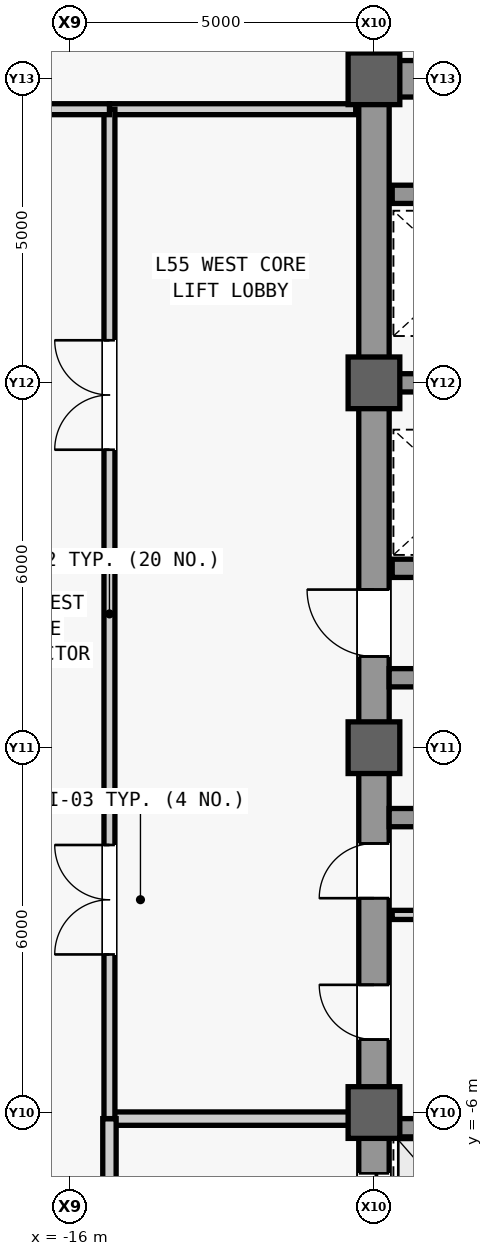
"""IFC4 building model, lengths in metres.
Left out: names, types, materials, properties, quantities, classifications, styles, units other than length and angle.
Written with IfcOpenShell. Run it as: python <this file> out.ifc"""

import sys

from ifc_helpers import new_model, si_unit, direction, frame, frame_2d, origin, origin_2d, place, context, subcontext, project, spatial, rectangle, extrude, source, transform, mapped, element, fill, save


model = new_model("IFC4")
c1 = context("Model", 3, precision=1e-05, world=origin(), true_north=direction((0.0, 1.0)))
c2 = subcontext(c1, "Body", "Model", "MODEL_VIEW")
j1 = project(units=[si_unit("LENGTHUNIT", "METRE"), si_unit("PLANEANGLEUNIT", "RADIAN")], contexts=[c1])
p1 = place(None, origin())
s1 = spatial("IfcSite", under=j1, at=p1, CompositionType="ELEMENT")
p2 = place(p1, origin())
s2 = spatial("IfcBuilding", under=s1, at=p2, CompositionType="ELEMENT")
p3 = place(p2, frame((0.0, 0.0, 235.1)))
s3 = spatial("IfcBuildingStorey", under=s2, at=p3, CompositionType="ELEMENT", Elevation=235.1)
m1 = source(origin(), c2, "Body", "SweptSolid", [
    extrude(rectangle(XDim=22.0, YDim=0.5, at=frame_2d((11.0, 0.0))), origin(), (0.0, 0.0, 1.0), 3.78),
])
p4 = place(p3, frame((-11.0, -11.0, 0.0), z_axis=(0.0, 0.0, 1.0), x_axis=(0.0, 1.0, 0.0)))
e1 = element("IfcWall", 1, at=p4, inside=s3, PredefinedType="SHEAR", context=c2, shape_type="MappedRepresentation", body=[
    mapped(m1, transform((0.0, 0.0, 0.0), scale=1.0)),
])
m2 = source(origin(), c2, "Body", "SweptSolid", [
    extrude(rectangle(XDim=1.1, YDim=2.2, at=frame_2d((0.55, 1.1))), frame((0.0, 0.26, 0.0), z_axis=(0.0, -1.0, 0.0), x_axis=(1.0, 0.0, 0.0)), (0.0, 0.0, 1.0), 0.52),
])
p5 = place(p4, frame((0.8, 0.0, 0.0)))
e2 = element("IfcOpeningElement", 2, at=p5, cuts=e1, PredefinedType="OPENING", context=c2, shape_type="MappedRepresentation", body=[
    mapped(m2, transform((0.0, 0.0, 0.0), scale=1.0)),
])
p6 = place(p4, frame((12.5, 0.0, 0.0)))
e3 = element("IfcOpeningElement", 3, at=p6, cuts=e1, PredefinedType="OPENING", context=c2, shape_type="MappedRepresentation", body=[
    mapped(m2, transform((0.0, 0.0, 0.0), scale=1.0)),
])
m3 = source(origin(), c2, "Body", "SweptSolid", [
    extrude(rectangle(XDim=0.9, YDim=2.15, at=frame_2d((0.45, 1.075))), frame((0.0, 0.26, 0.0), z_axis=(0.0, -1.0, 0.0), x_axis=(1.0, 0.0, 0.0)), (0.0, 0.0, 1.0), 0.52),
])
p7 = place(p4, frame((6.2, 0.0, 0.0)))
e4 = element("IfcOpeningElement", 4, at=p7, cuts=e1, PredefinedType="OPENING", context=c2, shape_type="MappedRepresentation", body=[
    mapped(m3, transform((0.0, 0.0, 0.0), scale=1.0)),
])
p8 = place(p4, frame((8.525, 0.0, 0.0)))
e5 = element("IfcOpeningElement", 5, at=p8, cuts=e1, PredefinedType="OPENING", context=c2, shape_type="MappedRepresentation", body=[
    mapped(m3, transform((0.0, 0.0, 0.0), scale=1.0)),
])
m4 = source(origin(), c2, "Body", "SweptSolid", [
    extrude(rectangle(XDim=1.3, YDim=2.3, at=frame_2d((0.65, 1.15))), frame((0.0, 0.26, 0.0), z_axis=(0.0, -1.0, 0.0), x_axis=(1.0, 0.0, 0.0)), (0.0, 0.0, 1.0), 0.52),
])
p9 = place(p4, frame((2.7, 0.0, 0.0)))
e6 = element("IfcOpeningElement", 6, at=p9, cuts=e1, PredefinedType="OPENING", context=c2, shape_type="MappedRepresentation", body=[
    mapped(m4, transform((0.0, 0.0, 0.0), scale=1.0)),
])
m5 = source(origin(), c2, "Body", "SweptSolid", [
    extrude(rectangle(XDim=5.9, YDim=0.6, at=frame_2d((2.95, 0.0))), origin(), (0.0, 0.0, 1.0), 3.78),
])
p10 = place(p3, frame((-10.75, 11.0, 0.0), z_axis=(0.0, 0.0, 1.0), x_axis=(1.0, 0.0, 0.0)))
e7 = element("IfcWall", 7, at=p10, inside=s3, PredefinedType="SHEAR", context=c2, shape_type="MappedRepresentation", body=[
    mapped(m5, transform((0.0, 0.0, 0.0), scale=1.0)),
])
m6 = source(origin(), c2, "Body", "SweptSolid", [
    extrude(rectangle(XDim=5.65, YDim=0.3, at=frame_2d((2.825, 0.0))), origin(), (0.0, 0.0, 1.0), 3.78),
])
for number, where, z_axis, x_axis in (
    (8, (-10.75, -1.15, 0.0), (0.0, 0.0, 1.0), (1.0, 0.0, 0.0)),
    (9, (-10.75, 1.15, 0.0), (0.0, 0.0, 1.0), (1.0, 0.0, 0.0)),
):
    element("IfcWall", number, at=place(p3, frame(where, z_axis=z_axis, x_axis=x_axis)), inside=s3, PredefinedType="SHEAR", context=c2, shape_type="MappedRepresentation", body=[
        mapped(m6, transform((0.0, 0.0, 0.0), scale=1.0)),
    ])
m7 = source(origin(), c2, "Body", "SweptSolid", [
    extrude(rectangle(XDim=0.85, YDim=0.85, at=origin_2d()), origin(), (0.0, 0.0, 1.0), 4.0),
])
for number, where, z_axis, x_axis in (
    (10, (-11.0, -6.0, 0.0), (0.0, 0.0, 1.0), (1.0, 0.0, 0.0)),
    (11, (-11.0, 0.0, 0.0), (0.0, 0.0, 1.0), (1.0, 0.0, 0.0)),
    (12, (-11.0, 6.0, 0.0), (0.0, 0.0, 1.0), (1.0, 0.0, 0.0)),
    (13, (-11.0, 11.0, 0.0), (0.0, 0.0, 1.0), (1.0, 0.0, 0.0)),
):
    element("IfcColumn", number, at=place(p3, frame(where, z_axis=z_axis, x_axis=x_axis)), inside=s3, PredefinedType="COLUMN", context=c2, shape_type="MappedRepresentation", body=[
        mapped(m7, transform((0.0, 0.0, 0.0), scale=1.0)),
    ])
m8 = source(origin(), c2, "Body", "SweptSolid", [
    extrude(rectangle(XDim=2.2, YDim=0.3, at=frame_2d((1.1, 0.0))), origin(), (0.0, 0.0, 1.0), 3.78),
])
for number, where, z_axis, x_axis in (
    (14, (-10.7, -6.25, 0.0), (0.0, 0.0, 1.0), (1.0, 0.0, 0.0)),
    (15, (-10.7, 2.95, 0.0), (0.0, 0.0, 1.0), (1.0, 0.0, 0.0)),
    (16, (-10.7, 6.0, 0.0), (0.0, 0.0, 1.0), (1.0, 0.0, 0.0)),
    (17, (-10.7, 9.1, 0.0), (0.0, 0.0, 1.0), (1.0, 0.0, 0.0)),
):
    element("IfcWall", number, at=place(p3, frame(where, z_axis=z_axis, x_axis=x_axis)), inside=s3, PredefinedType="SHEAR", context=c2, shape_type="MappedRepresentation", body=[
        mapped(m8, transform((0.0, 0.0, 0.0), scale=1.0)),
    ])
m9 = source(origin(), c2, "Body", "SweptSolid", [
    extrude(rectangle(XDim=2.05, YDim=0.15, at=frame_2d((1.025, 0.0))), origin(), (0.0, 0.0, 1.0), 3.78),
])
p11 = place(p3, frame((-10.7, -2.75, 0.0), z_axis=(0.0, 0.0, 1.0), x_axis=(1.0, 0.0, 0.0)))
e18 = element("IfcWall", 18, at=p11, inside=s3, PredefinedType="PARTITIONING", context=c2, shape_type="MappedRepresentation", body=[
    mapped(m9, transform((0.0, 0.0, 0.0), scale=1.0)),
])
m10 = source(origin(), c2, "Body", "SweptSolid", [
    extrude(rectangle(XDim=4.05, YDim=0.22, at=frame_2d((2.025, 0.0))), origin(), (0.0, 0.0, 1.0), 3.085),
])
p12 = place(p3, frame((-15.35, -6.1, 0.0), z_axis=(0.0, 0.0, 1.0), x_axis=(1.0, 0.0, 0.0)))
e19 = element("IfcWall", 19, at=p12, inside=s3, PredefinedType="PARTITIONING", context=c2, shape_type="MappedRepresentation", body=[
    mapped(m10, transform((0.0, 0.0, 0.0), scale=1.0)),
])
m11 = source(origin(), c2, "Body", "SweptSolid", [
    extrude(rectangle(XDim=4.4, YDim=0.22, at=frame_2d((2.2, 0.0))), origin(), (0.0, 0.0, 1.0), 3.78),
])
p13 = place(p3, frame((-15.35, -10.5, 0.0), z_axis=(0.0, 0.0, 1.0), x_axis=(0.0, 1.0, 0.0)))
e20 = element("IfcWall", 20, at=p13, inside=s3, PredefinedType="PARTITIONING", context=c2, shape_type="MappedRepresentation", body=[
    mapped(m11, transform((0.0, 0.0, 0.0), scale=1.0)),
])
m12 = source(origin(), c2, "Body", "SweptSolid", [
    extrude(rectangle(XDim=1.2, YDim=2.2, at=frame_2d((0.6, 1.1))), frame((0.0, 0.12, 0.0), z_axis=(0.0, -1.0, 0.0), x_axis=(1.0, 0.0, 0.0)), (0.0, 0.0, 1.0), 0.24),
])
p14 = place(p13, frame((1.6, 0.0, 0.0)))
e21 = element("IfcOpeningElement", 21, at=p14, cuts=e20, PredefinedType="OPENING", context=c2, shape_type="MappedRepresentation", body=[
    mapped(m12, transform((0.0, 0.0, 0.0), scale=1.0)),
])
m13 = source(origin(), c2, "Body", "SweptSolid", [
    extrude(rectangle(XDim=4.05, YDim=0.18, at=frame_2d((2.025, 0.0))), origin(), (0.0, 0.0, 1.0), 3.78),
])
p15 = place(p3, frame((-15.35, 10.5, 0.0), z_axis=(0.0, 0.0, 1.0), x_axis=(1.0, 0.0, 0.0)))
e22 = element("IfcWall", 22, at=p15, inside=s3, PredefinedType="PARTITIONING", context=c2, shape_type="MappedRepresentation", body=[
    mapped(m13, transform((0.0, 0.0, 0.0), scale=1.0)),
])
m14 = source(origin(), c2, "Body", "SweptSolid", [
    extrude(rectangle(XDim=16.6, YDim=0.18, at=frame_2d((8.3, 0.0))), origin(), (0.0, 0.0, 1.0), 3.78),
])
p16 = place(p3, frame((-15.35, -6.1, 0.0), z_axis=(0.0, 0.0, 1.0), x_axis=(0.0, 1.0, 0.0)))
e23 = element("IfcWall", 23, at=p16, inside=s3, PredefinedType="PARTITIONING", context=c2, shape_type="MappedRepresentation", body=[
    mapped(m14, transform((0.0, 0.0, 0.0), scale=1.0)),
])
m15 = source(origin(), c2, "Body", "SweptSolid", [
    extrude(rectangle(XDim=1.8, YDim=2.25, at=frame_2d((0.9, 1.125))), frame((0.0, 0.1, 0.0), z_axis=(0.0, -1.0, 0.0), x_axis=(1.0, 0.0, 0.0)), (0.0, 0.0, 1.0), 0.2),
])
p17 = place(p16, frame((2.7, 0.0, 0.0)))
e24 = element("IfcOpeningElement", 24, at=p17, cuts=e23, PredefinedType="OPENING", context=c2, shape_type="MappedRepresentation", body=[
    mapped(m15, transform((0.0, 0.0, 0.0), scale=1.0)),
])
p18 = place(p16, frame((11.0, 0.0, 0.0)))
e25 = element("IfcOpeningElement", 25, at=p18, cuts=e23, PredefinedType="OPENING", context=c2, shape_type="MappedRepresentation", body=[
    mapped(m15, transform((0.0, 0.0, 0.0), scale=1.0)),
])
m16 = source(origin(), c2, "Body", "SweptSolid", [
    extrude(rectangle(XDim=2.45, YDim=0.18, at=frame_2d((1.225, 0.0))), origin(), (0.0, 0.0, 1.0), 3.78),
])
p19 = place(p3, frame((-17.8, 10.5, 0.0), z_axis=(0.0, 0.0, 1.0), x_axis=(1.0, 0.0, 0.0)))
e26 = element("IfcWall", 26, at=p19, inside=s3, PredefinedType="PARTITIONING", context=c2, shape_type="MappedRepresentation", body=[
    mapped(m16, transform((0.0, 0.0, 0.0), scale=1.0)),
])
m17 = source(origin(), c2, "Body", "SweptSolid", [
    extrude(rectangle(XDim=1.1, YDim=2.2, at=frame_2d((0.55, 1.1))), frame((0.0, 0.025, 0.0), z_axis=(0.0, -1.0, 0.0), x_axis=(1.0, 0.0, 0.0)), (0.0, 0.0, 1.0), 0.05),
])
p20 = place(p6, origin())
e27 = element("IfcDoor", 27, at=p20, inside=s3, OperationType="SINGLE_SWING_RIGHT", PredefinedType="DOOR", context=c2, shape_type="MappedRepresentation", body=[
    mapped(m17, transform((0.0, 0.0, 0.0), scale=1.0)),
])
fill(e3, e27)
m18 = source(origin(), c2, "Body", "SweptSolid", [
    extrude(rectangle(XDim=0.9, YDim=2.15, at=frame_2d((0.45, 1.075))), frame((0.0, 0.025, 0.0), z_axis=(0.0, -1.0, 0.0), x_axis=(1.0, 0.0, 0.0)), (0.0, 0.0, 1.0), 0.05),
])
p21 = place(p7, origin())
e28 = element("IfcDoor", 28, at=p21, inside=s3, OperationType="SINGLE_SWING_RIGHT", PredefinedType="DOOR", context=c2, shape_type="MappedRepresentation", body=[
    mapped(m18, transform((0.0, 0.0, 0.0), scale=1.0)),
])
fill(e4, e28)
p22 = place(p8, origin())
e29 = element("IfcDoor", 29, at=p22, inside=s3, OperationType="SINGLE_SWING_LEFT", PredefinedType="DOOR", context=c2, shape_type="MappedRepresentation", body=[
    mapped(m18, transform((0.0, 0.0, 0.0), scale=1.0)),
])
fill(e5, e29)
m19 = source(origin(), c2, "Body", "SweptSolid", [
    extrude(rectangle(XDim=1.8, YDim=2.25, at=frame_2d((0.9, 1.125))), frame((0.0, 0.025, 0.0), z_axis=(0.0, -1.0, 0.0), x_axis=(1.0, 0.0, 0.0)), (0.0, 0.0, 1.0), 0.05),
])
p23 = place(p17, origin())
e30 = element("IfcDoor", 30, at=p23, inside=s3, OperationType="SINGLE_SWING_LEFT", PredefinedType="DOOR", context=c2, shape_type="MappedRepresentation", body=[
    mapped(m19, transform((0.0, 0.0, 0.0), scale=1.0)),
])
fill(e24, e30)
p24 = place(p18, origin())
e31 = element("IfcDoor", 31, at=p24, inside=s3, OperationType="SINGLE_SWING_RIGHT", PredefinedType="DOOR", context=c2, shape_type="MappedRepresentation", body=[
    mapped(m19, transform((0.0, 0.0, 0.0), scale=1.0)),
])
fill(e25, e31)
m20 = source(origin(), c2, "Body", "SweptSolid", [
    extrude(rectangle(XDim=1.3, YDim=2.3, at=frame_2d((0.65, 1.15))), frame((0.0, 0.025, 0.0), z_axis=(0.0, -1.0, 0.0), x_axis=(1.0, 0.0, 0.0)), (0.0, 0.0, 1.0), 0.05),
])
p25 = place(p9, origin())
e32 = element("IfcDoor", 32, at=p25, inside=s3, OperationType="SLIDING_TO_LEFT", PredefinedType="DOOR", context=c2, shape_type="MappedRepresentation", body=[
    mapped(m20, transform((0.0, 0.0, 0.0), scale=1.0)),
])
fill(e6, e32)
save(model, sys.argv[1])
